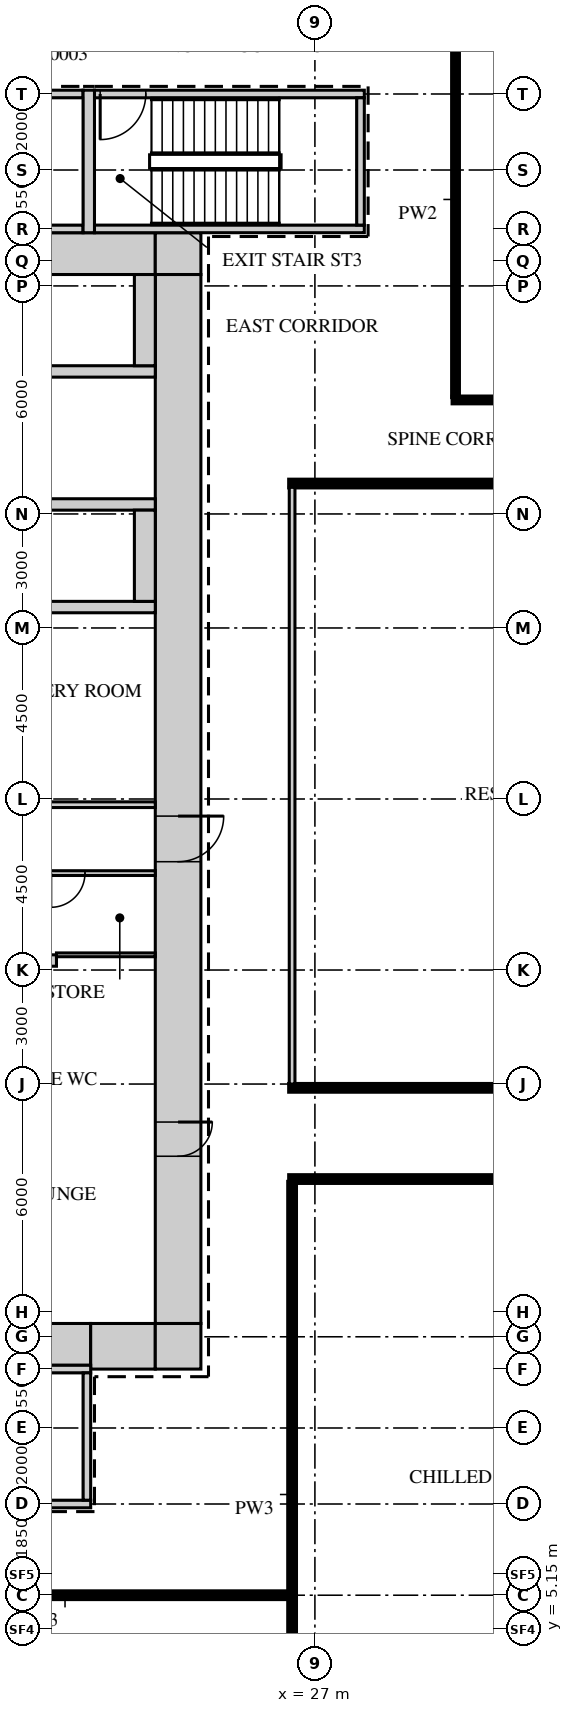
"""IFC4 building model, lengths in metres.
Left out: names, types, materials, properties, quantities, classifications, styles, units other than length and angle.
Written with IfcOpenShell. Run it as: python <this file> out.ifc"""

import sys

from ifc_helpers import new_model, si_unit, direction, frame, frame_2d, origin, place, context, subcontext, project, spatial, rectangle, extrude, source, transform, mapped, element, fill, save


model = new_model("IFC4")
c1 = context("Model", 3, precision=1e-05, world=origin(), true_north=direction((0.0, 1.0)))
c2 = subcontext(c1, "Body", "Model", "MODEL_VIEW")
j1 = project(units=[si_unit("LENGTHUNIT", "METRE"), si_unit("PLANEANGLEUNIT", "RADIAN")], contexts=[c1])
p1 = place(None, origin())
s1 = spatial("IfcSite", under=j1, at=p1, CompositionType="ELEMENT")
p2 = place(p1, origin())
s2 = spatial("IfcBuilding", under=s1, at=p2, CompositionType="ELEMENT")
p3 = place(p2, frame((0.0, 0.0, -9.0)))
s3 = spatial("IfcBuildingStorey", under=s2, at=p3, CompositionType="ELEMENT", Elevation=-9.0)
m1 = source(origin(), c2, "Body", "SweptSolid", [
    extrude(rectangle(XDim=8.9, YDim=1.1, at=frame_2d((4.45, 0.0))), origin(), (0.0, 0.0, 1.0), 4.2),
])
p4 = place(p3, frame((13.9, 41.35, 0.0), z_axis=(0.0, 0.0, 1.0), x_axis=(1.0, 0.0, 0.0)))
e1 = element("IfcWall", 1, at=p4, inside=s3, PredefinedType="SHEAR", context=c2, shape_type="MappedRepresentation", body=[
    mapped(m1, transform((0.0, 0.0, 0.0))),
])
m2 = source(origin(), c2, "Body", "SweptSolid", [
    extrude(rectangle(XDim=1.2, YDim=1.1, at=frame_2d((0.6, 0.0))), origin(), (0.0, 0.0, 1.0), 4.2),
])
p5 = place(p3, frame((22.8, 41.35, 0.0), z_axis=(0.0, 0.0, 1.0), x_axis=(1.0, 0.0, 0.0)))
e2 = element("IfcWall", 2, at=p5, inside=s3, PredefinedType="SHEAR", context=c2, shape_type="MappedRepresentation", body=[
    mapped(m2, transform((0.0, 0.0, 0.0))),
])
m3 = source(origin(), c2, "Body", "SweptSolid", [
    extrude(rectangle(XDim=7.2, YDim=1.1, at=frame_2d((3.6, 0.0))), origin(), (0.0, 0.0, 1.0), 4.2),
])
p6 = place(p3, frame((13.9, 12.65, 0.0), z_axis=(0.0, 0.0, 1.0), x_axis=(1.0, 0.0, 0.0)))
e3 = element("IfcWall", 3, at=p6, inside=s3, PredefinedType="SHEAR", context=c2, shape_type="MappedRepresentation", body=[
    mapped(m3, transform((0.0, 0.0, 0.0))),
])
m4 = source(origin(), c2, "Body", "SweptSolid", [
    extrude(rectangle(XDim=1.0, YDim=2.1, at=frame_2d((0.5, 1.05))), frame((0.0, 0.56, 0.0), z_axis=(0.0, -1.0, 0.0), x_axis=(1.0, 0.0, 0.0)), (0.0, 0.0, 1.0), 1.12),
])
p7 = place(p6, frame((0.8, 0.0, 0.0)))
e4 = element("IfcOpeningElement", 4, at=p7, cuts=e3, PredefinedType="OPENING", context=c2, shape_type="MappedRepresentation", body=[
    mapped(m4, transform((0.0, 0.0, 0.0))),
])
m5 = source(origin(), c2, "Body", "SweptSolid", [
    extrude(rectangle(XDim=1.7, YDim=1.2, at=frame_2d((0.85, 0.0))), origin(), (0.0, 0.0, 1.0), 4.2),
])
p8 = place(p3, frame((21.1, 12.6, 0.0), z_axis=(0.0, 0.0, 1.0), x_axis=(1.0, 0.0, 0.0)))
e5 = element("IfcWall", 5, at=p8, inside=s3, PredefinedType="SHEAR", context=c2, shape_type="MappedRepresentation", body=[
    mapped(m5, transform((0.0, 0.0, 0.0))),
])
m6 = source(origin(), c2, "Body", "SweptSolid", [
    extrude(rectangle(XDim=1.2, YDim=1.2, at=frame_2d((0.6, 0.0))), origin(), (0.0, 0.0, 1.0), 4.2),
])
p9 = place(p3, frame((22.8, 12.6, 0.0), z_axis=(0.0, 0.0, 1.0), x_axis=(1.0, 0.0, 0.0)))
e6 = element("IfcWall", 6, at=p9, inside=s3, PredefinedType="SHEAR", context=c2, shape_type="MappedRepresentation", body=[
    mapped(m6, transform((0.0, 0.0, 0.0))),
])
m7 = source(origin(), c2, "Body", "SweptSolid", [
    extrude(rectangle(XDim=27.6, YDim=1.2, at=frame_2d((13.8, 0.0))), origin(), (0.0, 0.0, 1.0), 4.2),
])
p10 = place(p3, frame((23.4, 13.2, 0.0), z_axis=(0.0, 0.0, 1.0), x_axis=(0.0, 1.0, 0.0)))
e7 = element("IfcWall", 7, at=p10, inside=s3, PredefinedType="SHEAR", context=c2, shape_type="MappedRepresentation", body=[
    mapped(m7, transform((0.0, 0.0, 0.0))),
])
m8 = source(origin(), c2, "Body", "SweptSolid", [
    extrude(rectangle(XDim=1.2, YDim=2.1, at=frame_2d((0.6, 1.05))), frame((0.0, 0.61, 0.0), z_axis=(0.0, -1.0, 0.0), x_axis=(1.0, 0.0, 0.0)), (0.0, 0.0, 1.0), 1.22),
])
p11 = place(p10, frame((12.15, 0.0, 0.0)))
e8 = element("IfcOpeningElement", 8, at=p11, cuts=e7, PredefinedType="OPENING", context=c2, shape_type="MappedRepresentation", body=[
    mapped(m8, transform((0.0, 0.0, 0.0))),
])
m9 = source(origin(), c2, "Body", "SweptSolid", [
    extrude(rectangle(XDim=0.9, YDim=2.1, at=frame_2d((0.45, 1.05))), frame((0.0, 0.61, 0.0), z_axis=(0.0, -1.0, 0.0), x_axis=(1.0, 0.0, 0.0)), (0.0, 0.0, 1.0), 1.22),
])
p12 = place(p10, frame((4.4, 0.0, 0.0)))
e9 = element("IfcOpeningElement", 9, at=p12, cuts=e7, PredefinedType="OPENING", context=c2, shape_type="MappedRepresentation", body=[
    mapped(m9, transform((0.0, 0.0, 0.0))),
])
m10 = source(origin(), c2, "Body", "SweptSolid", [
    extrude(rectangle(XDim=7.0, YDim=0.2, at=frame_2d((3.5, 0.0))), origin(), (0.0, 0.0, 1.0), 4.2),
])
p13 = place(p3, frame((13.9, 45.55, 0.0), z_axis=(0.0, 0.0, 1.0), x_axis=(1.0, 0.0, 0.0)))
e10 = element("IfcWall", 10, at=p13, inside=s3, PredefinedType="SHEAR", context=c2, shape_type="MappedRepresentation", body=[
    mapped(m10, transform((0.0, 0.0, 0.0))),
])
m11 = source(origin(), c2, "Body", "SweptSolid", [
    extrude(rectangle(XDim=1.2, YDim=2.1, at=frame_2d((0.6, 1.05))), frame((0.0, 0.11, 0.0), z_axis=(0.0, -1.0, 0.0), x_axis=(1.0, 0.0, 0.0)), (0.0, 0.0, 1.0), 0.22),
])
p14 = place(p13, frame((0.35, 0.0, 0.0)))
e11 = element("IfcOpeningElement", 11, at=p14, cuts=e10, PredefinedType="OPENING", context=c2, shape_type="MappedRepresentation", body=[
    mapped(m11, transform((0.0, 0.0, 0.0))),
])
p15 = place(p3, frame((13.9, 42.0, 0.0), z_axis=(0.0, 0.0, 1.0), x_axis=(1.0, 0.0, 0.0)))
e12 = element("IfcWall", 12, at=p15, inside=s3, PredefinedType="SHEAR", context=c2, shape_type="MappedRepresentation", body=[
    mapped(m10, transform((0.0, 0.0, 0.0))),
])
m12 = source(origin(), c2, "Body", "SweptSolid", [
    extrude(rectangle(XDim=5.3, YDim=0.2, at=frame_2d((2.65, 0.0))), origin(), (0.0, 0.0, 1.0), 4.2),
])
p16 = place(p3, frame((15.8, 12.0, 0.0), z_axis=(0.0, 0.0, 1.0), x_axis=(1.0, 0.0, 0.0)))
e13 = element("IfcWall", 13, at=p16, inside=s3, PredefinedType="SHEAR", context=c2, shape_type="MappedRepresentation", body=[
    mapped(m12, transform((0.0, 0.0, 0.0))),
])
m13 = source(origin(), c2, "Body", "SweptSolid", [
    extrude(rectangle(XDim=7.2, YDim=0.2, at=frame_2d((3.6, 0.0))), origin(), (0.0, 0.0, 1.0), 4.2),
])
p17 = place(p3, frame((13.9, 8.45, 0.0), z_axis=(0.0, 0.0, 1.0), x_axis=(1.0, 0.0, 0.0)))
e14 = element("IfcWall", 14, at=p17, inside=s3, PredefinedType="SHEAR", context=c2, shape_type="MappedRepresentation", body=[
    mapped(m13, transform((0.0, 0.0, 0.0))),
])
p18 = place(p17, frame((0.35, 0.0, 0.0)))
e15 = element("IfcOpeningElement", 15, at=p18, cuts=e14, PredefinedType="OPENING", context=c2, shape_type="MappedRepresentation", body=[
    mapped(m11, transform((0.0, 0.0, 0.0))),
])
m14 = source(origin(), c2, "Body", "SweptSolid", [
    extrude(rectangle(XDim=7.1, YDim=0.2, at=frame_2d((3.55, 0.0))), origin(), (0.0, 0.0, 1.0), 4.2),
])
p19 = place(p3, frame((21.2, 45.55, 0.0), z_axis=(0.0, 0.0, 1.0), x_axis=(1.0, 0.0, 0.0)))
e16 = element("IfcWall", 16, at=p19, inside=s3, PredefinedType="SHEAR", context=c2, shape_type="MappedRepresentation", body=[
    mapped(m14, transform((0.0, 0.0, 0.0))),
])
p20 = place(p19, frame((0.15, 0.0, 0.0)))
e17 = element("IfcOpeningElement", 17, at=p20, cuts=e16, PredefinedType="OPENING", context=c2, shape_type="MappedRepresentation", body=[
    mapped(m11, transform((0.0, 0.0, 0.0))),
])
p21 = place(p3, frame((21.2, 42.0, 0.0), z_axis=(0.0, 0.0, 1.0), x_axis=(1.0, 0.0, 0.0)))
e18 = element("IfcWall", 18, at=p21, inside=s3, PredefinedType="SHEAR", context=c2, shape_type="MappedRepresentation", body=[
    mapped(m14, transform((0.0, 0.0, 0.0))),
])
m15 = source(origin(), c2, "Body", "SweptSolid", [
    extrude(rectangle(XDim=3.75, YDim=0.3, at=frame_2d((1.875, 0.0))), origin(), (0.0, 0.0, 1.0), 4.2),
])
p22 = place(p3, frame((21.05, 41.9, 0.0), z_axis=(0.0, 0.0, 1.0), x_axis=(0.0, 1.0, 0.0)))
e19 = element("IfcWall", 19, at=p22, inside=s3, PredefinedType="SHEAR", context=c2, shape_type="MappedRepresentation", body=[
    mapped(m15, transform((0.0, 0.0, 0.0))),
])
m16 = source(origin(), c2, "Body", "SweptSolid", [
    extrude(rectangle(XDim=3.35, YDim=0.2, at=frame_2d((1.675, 0.0))), origin(), (0.0, 0.0, 1.0), 4.2),
])
for number, where, z_axis, x_axis in (
    (20, (21.0, 8.55, 0.0), (0.0, 0.0, 1.0), (0.0, 1.0, 0.0)),
    (21, (28.2, 42.1, 0.0), (0.0, 0.0, 1.0), (0.0, 1.0, 0.0)),
):
    element("IfcWall", number, at=place(p3, frame(where, z_axis=z_axis, x_axis=x_axis)), inside=s3, PredefinedType="SHEAR", context=c2, shape_type="MappedRepresentation", body=[
        mapped(m16, transform((0.0, 0.0, 0.0))),
    ])
m17 = source(origin(), c2, "Body", "SweptSolid", [
    extrude(rectangle(XDim=13.0, YDim=0.3, at=frame_2d((6.5, 0.0))), origin(), (0.0, 0.0, 1.0), 4.2),
])
p23 = place(p3, frame((7.2, 22.75, 0.0), z_axis=(0.0, 0.0, 1.0), x_axis=(1.0, 0.0, 0.0)))
e22 = element("IfcWall", 22, at=p23, inside=s3, PredefinedType="STANDARD", context=c2, shape_type="MappedRepresentation", body=[
    mapped(m17, transform((0.0, 0.0, 0.0))),
])
m18 = source(origin(), c2, "Body", "SweptSolid", [
    extrude(rectangle(XDim=15.6, YDim=0.3, at=frame_2d((7.8, 0.0))), origin(), (0.0, 0.0, 1.0), 4.2),
])
for number, where, z_axis, x_axis in (
    (23, (7.2, 32.05, 0.0), (0.0, 0.0, 1.0), (1.0, 0.0, 0.0)),
    (24, (7.2, 38.25, 0.0), (0.0, 0.0, 1.0), (1.0, 0.0, 0.0)),
    (25, (7.2, 34.75, 0.0), (0.0, 0.0, 1.0), (1.0, 0.0, 0.0)),
):
    element("IfcWall", number, at=place(p3, frame(where, z_axis=z_axis, x_axis=x_axis)), inside=s3, PredefinedType="STANDARD", context=c2, shape_type="MappedRepresentation", body=[
        mapped(m18, transform((0.0, 0.0, 0.0))),
    ])
m19 = source(origin(), c2, "Body", "SweptSolid", [
    extrude(rectangle(XDim=2.4, YDim=0.55, at=frame_2d((1.2, 0.0))), origin(), (0.0, 0.0, 1.0), 4.2),
])
for number, where, z_axis, x_axis in (
    (26, (22.525, 38.4, 0.0), (0.0, 0.0, 1.0), (0.0, 1.0, 0.0)),
    (27, (22.525, 32.2, 0.0), (0.0, 0.0, 1.0), (0.0, 1.0, 0.0)),
):
    element("IfcWall", number, at=place(p3, frame(where, z_axis=z_axis, x_axis=x_axis)), inside=s3, PredefinedType="STANDARD", context=c2, shape_type="MappedRepresentation", body=[
        mapped(m19, transform((0.0, 0.0, 0.0))),
    ])
m20 = source(origin(), c2, "Body", "SweptSolid", [
    extrude(rectangle(XDim=16.4, YDim=0.15, at=frame_2d((8.2, 0.0))), origin(), (0.0, 0.0, 1.0), 4.2),
])
p24 = place(p3, frame((26.4, 0.5, 0.0), z_axis=(0.0, 0.0, 1.0), x_axis=(0.0, 1.0, 0.0)))
e28 = element("IfcWall", 28, at=p24, inside=s3, PredefinedType="PARTITIONING", context=c2, shape_type="MappedRepresentation", body=[
    mapped(m20, transform((0.0, 0.0, 0.0))),
])
m21 = source(origin(), c2, "Body", "SweptSolid", [
    extrude(rectangle(XDim=22.0, YDim=0.15, at=frame_2d((11.0, 0.0))), origin(), (0.0, 0.0, 1.0), 4.2),
])
p25 = place(p3, frame((4.3, 6.05, 0.0), z_axis=(0.0, 0.0, 1.0), x_axis=(1.0, 0.0, 0.0)))
e29 = element("IfcWall", 29, at=p25, inside=s3, PredefinedType="PARTITIONING", context=c2, shape_type="MappedRepresentation", body=[
    mapped(m21, transform((0.0, 0.0, 0.0))),
])
m22 = source(origin(), c2, "Body", "SweptSolid", [
    extrude(rectangle(XDim=1.2, YDim=2.1, at=frame_2d((0.6, 1.05))), frame((0.0, 0.085, 0.0), z_axis=(0.0, -1.0, 0.0), x_axis=(1.0, 0.0, 0.0)), (0.0, 0.0, 1.0), 0.17),
])
p26 = place(p25, frame((9.05, 0.0, 0.0)))
e30 = element("IfcOpeningElement", 30, at=p26, cuts=e29, PredefinedType="OPENING", context=c2, shape_type="MappedRepresentation", body=[
    mapped(m22, transform((0.0, 0.0, 0.0))),
])
m23 = source(origin(), c2, "Body", "SweptSolid", [
    extrude(rectangle(XDim=54.15, YDim=0.15, at=frame_2d((27.075, 0.0))), origin(), (0.0, 0.0, 1.0), 4.2),
])
p27 = place(p3, frame((26.35, 17.0, 0.0), z_axis=(0.0, 0.0, 1.0), x_axis=(1.0, 0.0, 0.0)))
e31 = element("IfcWall", 31, at=p27, inside=s3, PredefinedType="PARTITIONING", context=c2, shape_type="MappedRepresentation", body=[
    mapped(m23, transform((0.0, 0.0, 0.0))),
])
p28 = place(p27, frame((6.25, 0.0, 0.0)))
e32 = element("IfcOpeningElement", 32, at=p28, cuts=e31, PredefinedType="OPENING", context=c2, shape_type="MappedRepresentation", body=[
    mapped(m22, transform((0.0, 0.0, 0.0))),
])
p29 = place(p27, frame((19.05, 0.0, 0.0)))
e33 = element("IfcOpeningElement", 33, at=p29, cuts=e31, PredefinedType="OPENING", context=c2, shape_type="MappedRepresentation", body=[
    mapped(m22, transform((0.0, 0.0, 0.0))),
])
p30 = place(p27, frame((31.05, 0.0, 0.0)))
e34 = element("IfcOpeningElement", 34, at=p30, cuts=e31, PredefinedType="OPENING", context=c2, shape_type="MappedRepresentation", body=[
    mapped(m22, transform((0.0, 0.0, 0.0))),
])
m24 = source(origin(), c2, "Body", "SweptSolid", [
    extrude(rectangle(XDim=0.9, YDim=2.1, at=frame_2d((0.45, 1.05))), frame((0.0, 0.085, 0.0), z_axis=(0.0, -1.0, 0.0), x_axis=(1.0, 0.0, 0.0)), (0.0, 0.0, 1.0), 0.17),
])
p31 = place(p27, frame((39.85, 0.0, 0.0)))
e35 = element("IfcOpeningElement", 35, at=p31, cuts=e31, PredefinedType="OPENING", context=c2, shape_type="MappedRepresentation", body=[
    mapped(m24, transform((0.0, 0.0, 0.0))),
])
p32 = place(p27, frame((48.2, 0.0, 0.0)))
e36 = element("IfcOpeningElement", 36, at=p32, cuts=e31, PredefinedType="OPENING", context=c2, shape_type="MappedRepresentation", body=[
    mapped(m22, transform((0.0, 0.0, 0.0))),
])
m25 = source(origin(), c2, "Body", "SweptSolid", [
    extrude(rectangle(XDim=31.6, YDim=0.15, at=frame_2d((15.8, 0.0))), origin(), (0.0, 0.0, 1.0), 4.2),
])
p33 = place(p3, frame((26.35, 19.4, 0.0), z_axis=(0.0, 0.0, 1.0), x_axis=(1.0, 0.0, 0.0)))
e37 = element("IfcWall", 37, at=p33, inside=s3, PredefinedType="PARTITIONING", context=c2, shape_type="MappedRepresentation", body=[
    mapped(m25, transform((0.0, 0.0, 0.0))),
])
p34 = place(p33, frame((8.25, 0.0, 0.0)))
e38 = element("IfcOpeningElement", 38, at=p34, cuts=e37, PredefinedType="OPENING", context=c2, shape_type="MappedRepresentation", body=[
    mapped(m22, transform((0.0, 0.0, 0.0))),
])
m26 = source(origin(), c2, "Body", "SweptSolid", [
    extrude(rectangle(XDim=15.7, YDim=0.15, at=frame_2d((7.85, 0.0))), origin(), (0.0, 0.0, 1.0), 4.2),
])
p35 = place(p3, frame((26.4, 19.5, 0.0), z_axis=(0.0, 0.0, 1.0), x_axis=(0.0, 1.0, 0.0)))
e39 = element("IfcWall", 39, at=p35, inside=s3, PredefinedType="PARTITIONING", context=c2, shape_type="MappedRepresentation", body=[
    mapped(m26, transform((0.0, 0.0, 0.0))),
])
m27 = source(origin(), c2, "Body", "SweptSolid", [
    extrude(rectangle(XDim=2.6, YDim=0.1, at=frame_2d((1.3, 0.0))), origin(), (0.0, 0.0, 1.0), 4.2),
])
p36 = place(p3, frame((20.2, 22.9, 0.0), z_axis=(0.0, 0.0, 1.0), x_axis=(1.0, 0.0, 0.0)))
e40 = element("IfcWall", 40, at=p36, inside=s3, PredefinedType="PARTITIONING", context=c2, shape_type="MappedRepresentation", body=[
    mapped(m27, transform((0.0, 0.0, 0.0))),
])
m28 = source(origin(), c2, "Body", "SweptSolid", [
    extrude(rectangle(XDim=15.6, YDim=0.125, at=frame_2d((7.8, 0.0))), origin(), (0.0, 0.0, 1.0), 4.2),
])
p37 = place(p3, frame((7.2, 25.05, 0.0), z_axis=(0.0, 0.0, 1.0), x_axis=(1.0, 0.0, 0.0)))
e41 = element("IfcWall", 41, at=p37, inside=s3, PredefinedType="PARTITIONING", context=c2, shape_type="MappedRepresentation", body=[
    mapped(m28, transform((0.0, 0.0, 0.0))),
])
m29 = source(origin(), c2, "Body", "SweptSolid", [
    extrude(rectangle(XDim=0.9, YDim=2.1, at=frame_2d((0.45, 1.05))), frame((0.0, 0.073, 0.0), z_axis=(0.0, -1.0, 0.0), x_axis=(1.0, 0.0, 0.0)), (0.0, 0.0, 1.0), 0.145),
])
p38 = place(p37, frame((1.5, 0.0, 0.0)))
e42 = element("IfcOpeningElement", 42, at=p38, cuts=e41, PredefinedType="OPENING", context=c2, shape_type="MappedRepresentation", body=[
    mapped(m29, transform((0.0, 0.0, 0.0))),
])
p39 = place(p37, frame((5.4, 0.0, 0.0)))
e43 = element("IfcOpeningElement", 43, at=p39, cuts=e41, PredefinedType="OPENING", context=c2, shape_type="MappedRepresentation", body=[
    mapped(m29, transform((0.0, 0.0, 0.0))),
])
m30 = source(origin(), c2, "Body", "SweptSolid", [
    extrude(rectangle(XDim=1.0, YDim=2.1, at=frame_2d((0.5, 1.05))), frame((0.0, 0.073, 0.0), z_axis=(0.0, -1.0, 0.0), x_axis=(1.0, 0.0, 0.0)), (0.0, 0.0, 1.0), 0.145),
])
p40 = place(p37, frame((8.9, 0.0, 0.0)))
e44 = element("IfcOpeningElement", 44, at=p40, cuts=e41, PredefinedType="OPENING", context=c2, shape_type="MappedRepresentation", body=[
    mapped(m30, transform((0.0, 0.0, 0.0))),
])
p41 = place(p37, frame((12.85, 0.0, 0.0)))
e45 = element("IfcOpeningElement", 45, at=p41, cuts=e41, PredefinedType="OPENING", context=c2, shape_type="MappedRepresentation", body=[
    mapped(m29, transform((0.0, 0.0, 0.0))),
])
m31 = source(origin(), c2, "Body", "SweptSolid", [
    extrude(rectangle(XDim=15.6, YDim=0.15, at=frame_2d((7.8, 0.0))), origin(), (0.0, 0.0, 1.0), 4.2),
])
p42 = place(p3, frame((7.2, 26.85, 0.0), z_axis=(0.0, 0.0, 1.0), x_axis=(1.0, 0.0, 0.0)))
e46 = element("IfcWall", 46, at=p42, inside=s3, PredefinedType="PARTITIONING", context=c2, shape_type="MappedRepresentation", body=[
    mapped(m31, transform((0.0, 0.0, 0.0))),
])
p43 = place(p42, frame((3.45, 0.0, 0.0)))
e47 = element("IfcOpeningElement", 47, at=p43, cuts=e46, PredefinedType="OPENING", context=c2, shape_type="MappedRepresentation", body=[
    mapped(m24, transform((0.0, 0.0, 0.0))),
])
p44 = place(p42, frame((11.25, 0.0, 0.0)))
e48 = element("IfcOpeningElement", 48, at=p44, cuts=e46, PredefinedType="OPENING", context=c2, shape_type="MappedRepresentation", body=[
    mapped(m24, transform((0.0, 0.0, 0.0))),
])
p45 = place(p3, frame((26.35, 35.3, 0.0), z_axis=(0.0, 0.0, 1.0), x_axis=(1.0, 0.0, 0.0)))
e49 = element("IfcWall", 49, at=p45, inside=s3, PredefinedType="PARTITIONING", context=c2, shape_type="MappedRepresentation", body=[
    mapped(m25, transform((0.0, 0.0, 0.0))),
])
p46 = place(p45, frame((24.05, 0.0, 0.0)))
e50 = element("IfcOpeningElement", 50, at=p46, cuts=e49, PredefinedType="OPENING", context=c2, shape_type="MappedRepresentation", body=[
    mapped(m22, transform((0.0, 0.0, 0.0))),
])
m32 = source(origin(), c2, "Body", "SweptSolid", [
    extrude(rectangle(XDim=15.3, YDim=0.125, at=frame_2d((7.65, 0.0))), origin(), (0.0, 0.0, 1.0), 4.2),
])
p47 = place(p3, frame((30.65, 37.5, 0.0), z_axis=(0.0, 0.0, 1.0), x_axis=(1.0, 0.0, 0.0)))
e51 = element("IfcWall", 51, at=p47, inside=s3, PredefinedType="PARTITIONING", context=c2, shape_type="MappedRepresentation", body=[
    mapped(m32, transform((0.0, 0.0, 0.0))),
])
m33 = source(origin(), c2, "Body", "SweptSolid", [
    extrude(rectangle(XDim=1.2, YDim=2.1, at=frame_2d((0.6, 1.05))), frame((0.0, 0.073, 0.0), z_axis=(0.0, -1.0, 0.0), x_axis=(1.0, 0.0, 0.0)), (0.0, 0.0, 1.0), 0.145),
])
p48 = place(p47, frame((6.95, 0.0, 0.0)))
e52 = element("IfcOpeningElement", 52, at=p48, cuts=e51, PredefinedType="OPENING", context=c2, shape_type="MappedRepresentation", body=[
    mapped(m33, transform((0.0, 0.0, 0.0))),
])
m34 = source(origin(), c2, "Body", "SweptSolid", [
    extrude(rectangle(XDim=10.35, YDim=0.125, at=frame_2d((5.175, 0.0))), origin(), (0.0, 0.0, 1.0), 4.2),
])
p49 = place(p3, frame((30.7, 37.6, 0.0), z_axis=(0.0, 0.0, 1.0), x_axis=(0.0, 1.0, 0.0)))
e53 = element("IfcWall", 53, at=p49, inside=s3, PredefinedType="PARTITIONING", context=c2, shape_type="MappedRepresentation", body=[
    mapped(m34, transform((0.0, 0.0, 0.0))),
])
m35 = source(origin(), c2, "Body", "SweptSolid", [
    extrude(rectangle(XDim=1.2, YDim=2.1, at=frame_2d((0.6, 1.05))), frame((0.0, 0.55, 0.0), z_axis=(0.0, -1.0, 0.0), x_axis=(1.0, 0.0, 0.0)), (0.0, 0.0, 1.0), 1.1),
])
p50 = place(p11, origin())
e54 = element("IfcDoor", 54, at=p50, inside=s3, OperationType="SINGLE_SWING_RIGHT", PredefinedType="DOOR", context=c2, shape_type="MappedRepresentation", body=[
    mapped(m35, transform((0.0, 0.0, 0.0))),
])
fill(e8, e54)
m36 = source(origin(), c2, "Body", "SweptSolid", [
    extrude(rectangle(XDim=0.9, YDim=2.1, at=frame_2d((0.45, 1.05))), frame((0.0, 0.025, 0.0), z_axis=(0.0, -1.0, 0.0), x_axis=(1.0, 0.0, 0.0)), (0.0, 0.0, 1.0), 0.05),
])
p51 = place(p41, origin())
e55 = element("IfcDoor", 55, at=p51, inside=s3, OperationType="SINGLE_SWING_LEFT", PredefinedType="DOOR", context=c2, shape_type="MappedRepresentation", body=[
    mapped(m36, transform((0.0, 0.0, 0.0))),
])
fill(e45, e55)
m37 = source(origin(), c2, "Body", "SweptSolid", [
    extrude(rectangle(XDim=0.9, YDim=2.1, at=frame_2d((0.45, 1.05))), frame((0.0, 0.55, 0.0), z_axis=(0.0, -1.0, 0.0), x_axis=(1.0, 0.0, 0.0)), (0.0, 0.0, 1.0), 1.1),
])
p52 = place(p12, origin())
e56 = element("IfcDoor", 56, at=p52, inside=s3, OperationType="SINGLE_SWING_RIGHT", PredefinedType="DOOR", context=c2, shape_type="MappedRepresentation", body=[
    mapped(m37, transform((0.0, 0.0, 0.0))),
])
fill(e9, e56)
m38 = source(origin(), c2, "Body", "SweptSolid", [
    extrude(rectangle(XDim=1.2, YDim=2.1, at=frame_2d((0.6, 1.05))), frame((0.0, 0.025, 0.0), z_axis=(0.0, -1.0, 0.0), x_axis=(1.0, 0.0, 0.0)), (0.0, 0.0, 1.0), 0.05),
])
p53 = place(p20, origin())
e57 = element("IfcDoor", 57, at=p53, inside=s3, OperationType="SINGLE_SWING_LEFT", PredefinedType="DOOR", context=c2, shape_type="MappedRepresentation", body=[
    mapped(m38, transform((0.0, 0.0, 0.0))),
])
fill(e17, e57)
save(model, sys.argv[1])
